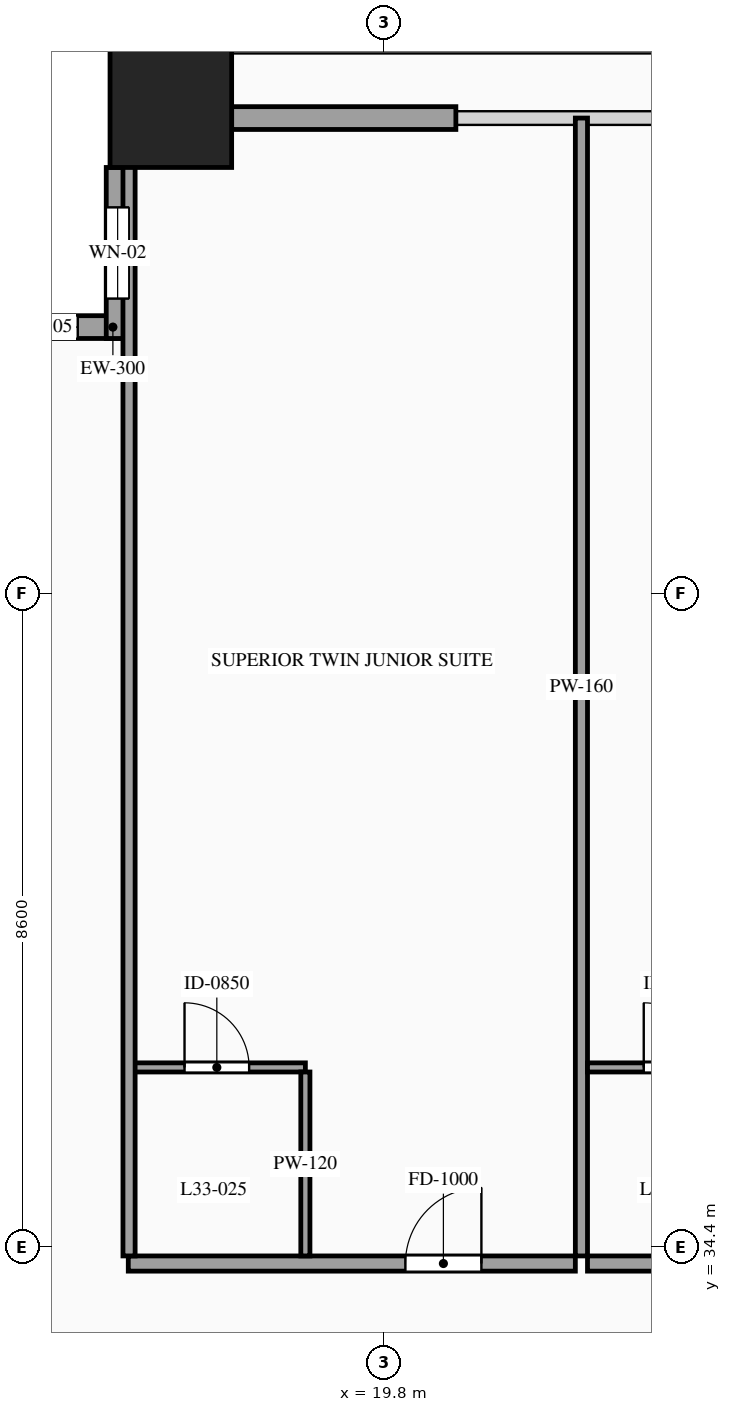
"""IFC4 building model, lengths in metres.
Left out: names, types, materials, properties, quantities, classifications, styles, units other than length and angle.
Written with IfcOpenShell. Run it as: python <this file> out.ifc"""

import sys

from ifc_helpers import new_model, si_unit, direction, frame, frame_2d, origin, origin_2d, place, context, subcontext, project, spatial, rectangle, hollow_rectangle, extrude, source, transform, mapped, element, fill, save


model = new_model("IFC4")
c1 = context("Model", 3, precision=1e-05, world=origin(), true_north=direction((0.0, 1.0)))
c2 = subcontext(c1, "Body", "Model", "MODEL_VIEW")
j1 = project(units=[si_unit("LENGTHUNIT", "METRE"), si_unit("PLANEANGLEUNIT", "RADIAN")], contexts=[c1])
p1 = place(None, origin())
s1 = spatial("IfcSite", under=j1, at=p1, CompositionType="ELEMENT")
p2 = place(p1, origin())
s2 = spatial("IfcBuilding", under=s1, at=p2, CompositionType="ELEMENT")
p3 = place(p2, frame((0.0, 0.0, 126.2)))
s3 = spatial("IfcBuildingStorey", under=s2, at=p3, CompositionType="ELEMENT", Elevation=126.2)
m1 = source(origin(), c2, "Body", "SweptSolid", [
    extrude(hollow_rectangle(XDim=1.6, YDim=1.6, WallThickness=0.07, at=origin_2d()), origin(), (0.0, 0.0, 1.0), 3.6),
])
p4 = place(p3, frame((17.0, 49.4, 0.0), z_axis=(0.0, 0.0, 1.0), x_axis=(1.0, 0.0, 0.0)))
e1 = element("IfcColumn", 1, at=p4, inside=s3, PredefinedType="COLUMN", context=c2, shape_type="MappedRepresentation", body=[
    mapped(m1, transform((0.0, 0.0, 0.0), scale=1.0)),
])
p5 = place(p3, frame((16.45, 46.5, 0.0), z_axis=(0.0, 0.0, 1.0), x_axis=(-1.0, 0.0, 0.0)))
e2 = element("IfcWall", 2, at=p5, inside=s3, PredefinedType="SOLIDWALL", context=c2, shape_type="SweptSolid", body=[
    extrude(rectangle(XDim=2.25, YDim=0.3, at=frame_2d((1.125, 0.0))), origin(), (0.0, 0.0, 1.0), 3.32),
])
p6 = place(p5, frame((0.675, 0.0, 0.85)))
e3 = element("IfcOpeningElement", 3, at=p6, cuts=e2, PredefinedType="OPENING", context=c2, shape_type="SweptSolid", body=[
    extrude(rectangle(XDim=0.9, YDim=1.5, at=frame_2d((0.45, 0.75))), frame((0.0, 0.165, 0.0), z_axis=(0.0, -1.0, 0.0), x_axis=(1.0, 0.0, 0.0)), (0.0, 0.0, 1.0), 0.33),
])
p7 = place(p3, frame((16.3, 48.6, 0.0), z_axis=(0.0, 0.0, 1.0), x_axis=(0.0, -1.0, 0.0)))
e4 = element("IfcWall", 4, at=p7, inside=s3, PredefinedType="SOLIDWALL", context=c2, shape_type="SweptSolid", body=[
    extrude(rectangle(XDim=2.25, YDim=0.3, at=frame_2d((1.125, 0.0))), origin(), (0.0, 0.0, 1.0), 3.32),
])
p8 = place(p7, frame((0.525, 0.0, 0.85)))
e5 = element("IfcOpeningElement", 5, at=p8, cuts=e4, PredefinedType="OPENING", context=c2, shape_type="SweptSolid", body=[
    extrude(rectangle(XDim=1.2, YDim=2.1, at=frame_2d((0.6, 1.05))), frame((0.0, 0.165, 0.0), z_axis=(0.0, -1.0, 0.0), x_axis=(1.0, 0.0, 0.0)), (0.0, 0.0, 1.0), 0.33),
])
m2 = source(origin(), c2, "Body", "SweptSolid", [
    extrude(rectangle(XDim=2.95, YDim=0.3, at=frame_2d((1.475, 0.0))), origin(), (0.0, 0.0, 1.0), 2.715),
])
p9 = place(p3, frame((17.8, 49.25, 0.0), z_axis=(0.0, 0.0, 1.0), x_axis=(1.0, 0.0, 0.0)))
e6 = element("IfcWall", 6, at=p9, inside=s3, PredefinedType="SOLIDWALL", context=c2, shape_type="MappedRepresentation", body=[
    mapped(m2, transform((0.0, 0.0, 0.0), scale=1.0)),
])
p10 = place(p3, frame((16.44, 34.18, 0.0), z_axis=(0.0, 0.0, 1.0), x_axis=(1.0, 0.0, 0.0)))
e7 = element("IfcWall", 7, at=p10, inside=s3, PredefinedType="PARTITIONING", context=c2, shape_type="SweptSolid", body=[
    extrude(rectangle(XDim=5.882, YDim=0.2, at=frame_2d((2.941, 0.0))), origin(), (0.0, 0.0, 1.0), 3.32),
])
p11 = place(p10, frame((3.646, 0.0, 0.0)))
e8 = element("IfcOpeningElement", 8, at=p11, cuts=e7, PredefinedType="OPENING", context=c2, shape_type="SweptSolid", body=[
    extrude(rectangle(XDim=1.0, YDim=2.2, at=frame_2d((0.5, 1.1))), frame((0.0, 0.115, 0.0), z_axis=(0.0, -1.0, 0.0), x_axis=(1.0, 0.0, 0.0)), (0.0, 0.0, 1.0), 0.23),
])
m3 = source(origin(), c2, "Body", "SweptSolid", [
    extrude(rectangle(XDim=14.97, YDim=0.16, at=frame_2d((7.485, 0.0))), origin(), (0.0, 0.0, 1.0), 3.32),
])
p12 = place(p3, frame((22.402, 34.28, 0.0), z_axis=(0.0, 0.0, 1.0), x_axis=(0.0, 1.0, 0.0)))
e9 = element("IfcWall", 9, at=p12, inside=s3, PredefinedType="PARTITIONING", context=c2, shape_type="MappedRepresentation", body=[
    mapped(m3, transform((0.0, 0.0, 0.0), scale=1.0)),
])
p13 = place(p3, frame((16.44, 36.76, 0.0), z_axis=(0.0, 0.0, 1.0), x_axis=(1.0, 0.0, 0.0)))
e10 = element("IfcWall", 10, at=p13, inside=s3, PredefinedType="PARTITIONING", context=c2, shape_type="SweptSolid", body=[
    extrude(rectangle(XDim=2.33, YDim=0.12, at=frame_2d((1.165, 0.0))), origin(), (0.0, 0.0, 1.0), 3.32),
])
p14 = place(p13, frame((0.74, 0.0, 0.0)))
e11 = element("IfcOpeningElement", 11, at=p14, cuts=e10, PredefinedType="OPENING", context=c2, shape_type="SweptSolid", body=[
    extrude(rectangle(XDim=0.85, YDim=2.1, at=frame_2d((0.425, 1.05))), frame((0.0, 0.075, 0.0), z_axis=(0.0, -1.0, 0.0), x_axis=(1.0, 0.0, 0.0)), (0.0, 0.0, 1.0), 0.15),
])
m4 = source(origin(), c2, "Body", "SweptSolid", [
    extrude(rectangle(XDim=2.42, YDim=0.12, at=frame_2d((1.21, 0.0))), origin(), (0.0, 0.0, 1.0), 3.32),
])
p15 = place(p3, frame((18.77, 34.28, 0.0), z_axis=(0.0, 0.0, 1.0), x_axis=(0.0, 1.0, 0.0)))
e12 = element("IfcWall", 12, at=p15, inside=s3, PredefinedType="PARTITIONING", context=c2, shape_type="MappedRepresentation", body=[
    mapped(m4, transform((0.0, 0.0, 0.0), scale=1.0)),
])
p16 = place(p3, frame((22.482, 34.18, 0.0), z_axis=(0.0, 0.0, 1.0), x_axis=(1.0, 0.0, 0.0)))
e13 = element("IfcWall", 13, at=p16, inside=s3, PredefinedType="PARTITIONING", context=c2, shape_type="SweptSolid", body=[
    extrude(rectangle(XDim=11.683, YDim=0.2, at=frame_2d((5.842, 0.0))), origin(), (0.0, 0.0, 1.0), 3.32),
])
p17 = place(p16, frame((6.547, 0.0, 0.0)))
e14 = element("IfcOpeningElement", 14, at=p17, cuts=e13, PredefinedType="OPENING", context=c2, shape_type="SweptSolid", body=[
    extrude(rectangle(XDim=1.0, YDim=2.2, at=frame_2d((0.5, 1.1))), frame((0.0, 0.115, 0.0), z_axis=(0.0, -1.0, 0.0), x_axis=(1.0, 0.0, 0.0)), (0.0, 0.0, 1.0), 0.23),
])
p18 = place(p3, frame((22.482, 36.76, 0.0), z_axis=(0.0, 0.0, 1.0), x_axis=(1.0, 0.0, 0.0)))
e15 = element("IfcWall", 15, at=p18, inside=s3, PredefinedType="PARTITIONING", context=c2, shape_type="SweptSolid", body=[
    extrude(rectangle(XDim=2.33, YDim=0.12, at=frame_2d((1.165, 0.0))), origin(), (0.0, 0.0, 1.0), 3.32),
])
p19 = place(p18, frame((0.74, 0.0, 0.0)))
e16 = element("IfcOpeningElement", 16, at=p19, cuts=e15, PredefinedType="OPENING", context=c2, shape_type="SweptSolid", body=[
    extrude(rectangle(XDim=0.85, YDim=2.1, at=frame_2d((0.425, 1.05))), frame((0.0, 0.075, 0.0), z_axis=(0.0, -1.0, 0.0), x_axis=(1.0, 0.0, 0.0)), (0.0, 0.0, 1.0), 0.15),
])
m5 = source(origin(), c2, "Body", "SweptSolid", [
    extrude(rectangle(XDim=14.82, YDim=0.16, at=frame_2d((7.41, 0.0))), origin(), (0.0, 0.0, 1.0), 3.32),
])
p20 = place(p3, frame((16.45, 34.28, 0.0), z_axis=(0.0, 0.0, 1.0), x_axis=(0.0, 1.0, 0.0)))
e17 = element("IfcWall", 17, at=p20, inside=s3, PredefinedType="PARTITIONING", context=c2, shape_type="MappedRepresentation", body=[
    mapped(m5, transform((0.0, 0.0, 0.0), scale=1.0)),
])
m6 = source(origin(), c2, "Body", "SweptSolid", [
    extrude(rectangle(XDim=0.9, YDim=1.5, at=frame_2d((0.45, 0.75))), frame((0.0, 0.03, 0.0), z_axis=(0.0, -1.0, 0.0), x_axis=(1.0, 0.0, 0.0)), (0.0, 0.0, 1.0), 0.06),
])
p21 = place(p6, origin())
e18 = element("IfcWindow", 18, at=p21, inside=s3, PartitioningType="SINGLE_PANEL", PredefinedType="WINDOW", context=c2, shape_type="MappedRepresentation", body=[
    mapped(m6, transform((0.0, 0.0, 0.0), scale=1.0)),
])
fill(e3, e18)
m7 = source(origin(), c2, "Body", "SweptSolid", [
    extrude(rectangle(XDim=1.2, YDim=2.1, at=frame_2d((0.6, 1.05))), frame((0.0, 0.03, 0.0), z_axis=(0.0, -1.0, 0.0), x_axis=(1.0, 0.0, 0.0)), (0.0, 0.0, 1.0), 0.06),
])
p22 = place(p8, origin())
e19 = element("IfcWindow", 19, at=p22, inside=s3, PartitioningType="SINGLE_PANEL", PredefinedType="WINDOW", context=c2, shape_type="MappedRepresentation", body=[
    mapped(m7, transform((0.0, 0.0, 0.0), scale=1.0)),
])
fill(e5, e19)
m8 = source(origin(), c2, "Body", "SweptSolid", [
    extrude(rectangle(XDim=1.0, YDim=2.2, at=frame_2d((0.5, 1.1))), frame((0.0, 0.025, 0.0), z_axis=(0.0, -1.0, 0.0), x_axis=(1.0, 0.0, 0.0)), (0.0, 0.0, 1.0), 0.05),
])
p23 = place(p11, origin())
e20 = element("IfcDoor", 20, at=p23, inside=s3, OperationType="SINGLE_SWING_RIGHT", PredefinedType="DOOR", context=c2, shape_type="MappedRepresentation", body=[
    mapped(m8, transform((0.0, 0.0, 0.0), scale=1.0)),
])
fill(e8, e20)
m9 = source(origin(), c2, "Body", "SweptSolid", [
    extrude(rectangle(XDim=0.85, YDim=2.1, at=frame_2d((0.425, 1.05))), frame((0.0, 0.025, 0.0), z_axis=(0.0, -1.0, 0.0), x_axis=(1.0, 0.0, 0.0)), (0.0, 0.0, 1.0), 0.05),
])
p24 = place(p14, origin())
e21 = element("IfcDoor", 21, at=p24, inside=s3, OperationType="SINGLE_SWING_LEFT", PredefinedType="DOOR", context=c2, shape_type="MappedRepresentation", body=[
    mapped(m9, transform((0.0, 0.0, 0.0), scale=1.0)),
])
fill(e11, e21)
p25 = place(p19, origin())
e22 = element("IfcDoor", 22, at=p25, inside=s3, OperationType="SINGLE_SWING_LEFT", PredefinedType="DOOR", context=c2, shape_type="MappedRepresentation", body=[
    mapped(m9, transform((0.0, 0.0, 0.0), scale=1.0)),
])
fill(e16, e22)
save(model, sys.argv[1])
